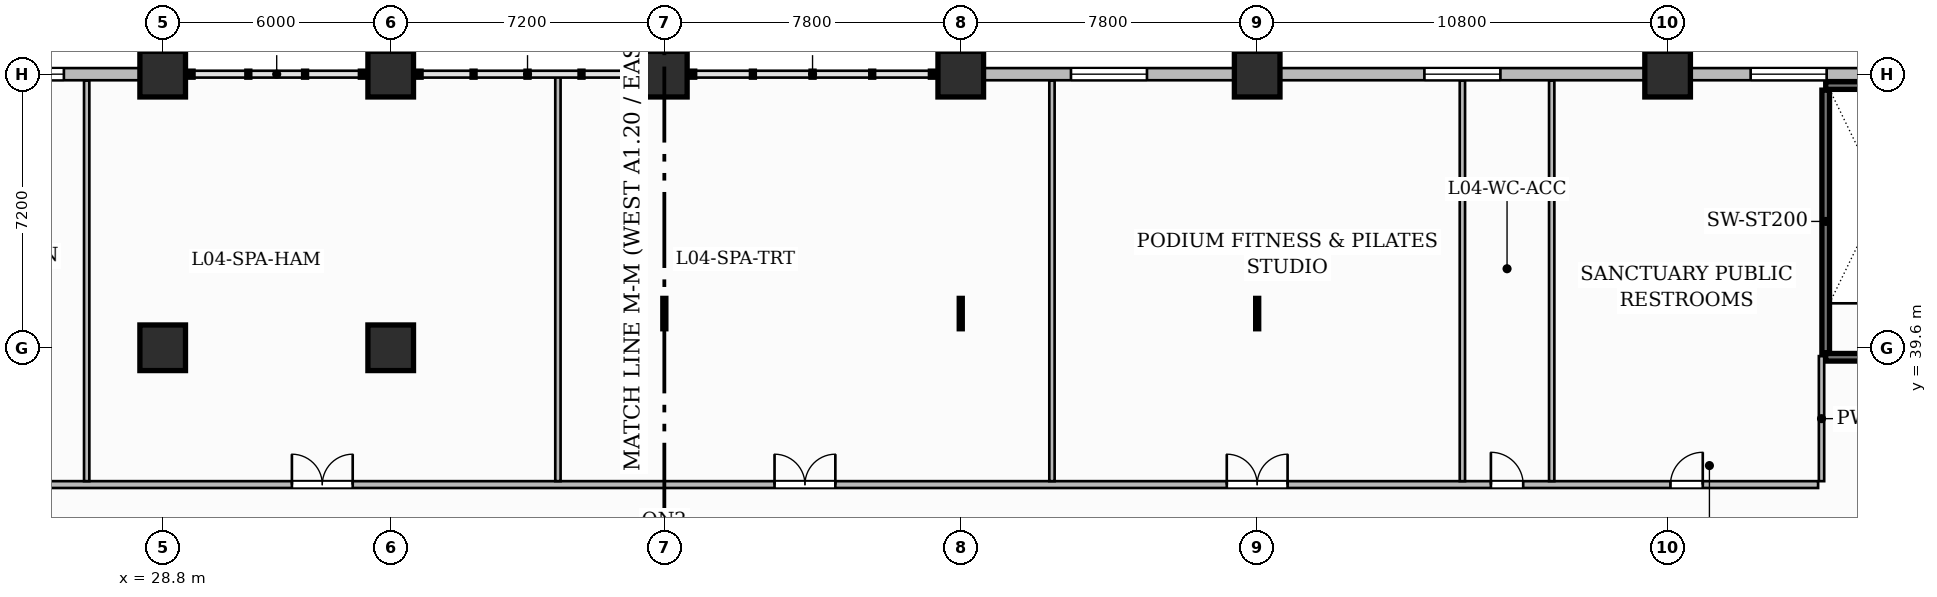
"""IFC4 building model, lengths in metres.
Left out: names, types, materials, properties, quantities, classifications, styles, units other than length and angle.
Written with IfcOpenShell. Run it as: python <this file> out.ifc"""

import sys

from ifc_helpers import new_model, si_unit, direction, frame, frame_2d, origin, origin_2d, place, context, subcontext, project, spatial, rectangle, extrude, source, transform, mapped, element, fill, save


model = new_model("IFC4")
c1 = context("Model", 3, precision=1e-05, world=origin(), true_north=direction((0.0, 1.0)))
c2 = subcontext(c1, "Body", "Model", "MODEL_VIEW")
j1 = project(units=[si_unit("LENGTHUNIT", "METRE"), si_unit("PLANEANGLEUNIT", "RADIAN")], contexts=[c1])
p1 = place(None, origin())
s1 = spatial("IfcSite", under=j1, at=p1, CompositionType="ELEMENT")
p2 = place(p1, origin())
s2 = spatial("IfcBuilding", under=s1, at=p2, CompositionType="ELEMENT")
p3 = place(p2, frame((0.0, 0.0, 21.6)))
s3 = spatial("IfcBuildingStorey", under=s2, at=p3, CompositionType="ELEMENT", Elevation=21.6)
m1 = source(origin(), c2, "Body", "SweptSolid", [
    extrude(rectangle(XDim=1.2, YDim=1.2, at=origin_2d()), origin(), (0.0, 0.0, 1.0), 5.4),
])
for number, where, z_axis, x_axis in (
    (1, (28.8, 39.6, 0.0), (0.0, 0.0, 1.0), (1.0, 0.0, 0.0)),
    (2, (28.8, 46.8, 0.0), (0.0, 0.0, 1.0), (1.0, 0.0, 0.0)),
    (3, (34.8, 39.6, 0.0), (0.0, 0.0, 1.0), (1.0, 0.0, 0.0)),
    (4, (34.8, 46.8, 0.0), (0.0, 0.0, 1.0), (1.0, 0.0, 0.0)),
    (5, (42.0, 46.8, 0.0), (0.0, 0.0, 1.0), (1.0, 0.0, 0.0)),
    (6, (49.8, 46.8, 0.0), (0.0, 0.0, 1.0), (1.0, 0.0, 0.0)),
    (7, (57.6, 46.8, 0.0), (0.0, 0.0, 1.0), (1.0, 0.0, 0.0)),
    (8, (68.4, 46.8, 0.0), (0.0, 0.0, 1.0), (1.0, 0.0, 0.0)),
):
    element("IfcColumn", number, at=place(p3, frame(where, z_axis=z_axis, x_axis=x_axis)), inside=s3, PredefinedType="COLUMN", context=c2, shape_type="MappedRepresentation", body=[
        mapped(m1, transform((0.0, 0.0, 0.0), scale=1.0)),
    ])
p4 = place(p3, frame((72.56, 39.47, 0.0), z_axis=(0.0, 0.0, 1.0), x_axis=(0.0, 1.0, 0.0)))
e9 = element("IfcWall", 9, at=p4, inside=s3, PredefinedType="SHEAR", context=c2, shape_type="SweptSolid", body=[
    extrude(rectangle(XDim=6.91, YDim=0.2, at=frame_2d((3.455, 0.0))), origin(), (0.0, 0.0, 1.0), 5.4),
])
p5 = place(p3, frame((72.56, 46.5, 0.0), z_axis=(0.0, 0.0, 1.0), x_axis=(1.0, 0.0, 0.0)))
e10 = element("IfcWall", 10, at=p5, inside=s3, PredefinedType="SHEAR", context=c2, shape_type="SweptSolid", body=[
    extrude(rectangle(XDim=2.94, YDim=0.2, at=frame_2d((1.47, 0.0))), origin(), (0.0, 0.0, 1.0), 5.4),
])
p6 = place(p3, frame((72.56, 39.35, 0.0), z_axis=(0.0, 0.0, 1.0), x_axis=(1.0, 0.0, 0.0)))
e11 = element("IfcWall", 11, at=p6, inside=s3, PredefinedType="SHEAR", context=c2, shape_type="SweptSolid", body=[
    extrude(rectangle(XDim=2.94, YDim=0.2, at=frame_2d((1.47, 0.0))), origin(), (0.0, 0.0, 1.0), 5.4),
])
p7 = place(p6, frame((0.985, 0.0, 0.0)))
e12 = element("IfcOpeningElement", 12, at=p7, cuts=e11, PredefinedType="OPENING", context=c2, shape_type="SweptSolid", body=[
    extrude(rectangle(XDim=1.05, YDim=2.2, at=frame_2d((0.525, 1.1))), frame((0.0, 0.11, 0.0), z_axis=(0.0, -1.0, 0.0), x_axis=(1.0, 0.0, 0.0)), (0.0, 0.0, 1.0), 0.22),
])
p8 = place(p3, frame((72.45, 36.09, 0.0), z_axis=(0.0, 0.0, 1.0), x_axis=(0.0, 1.0, 0.0)))
e13 = element("IfcWall", 13, at=p8, inside=s3, PredefinedType="PARTITIONING", context=c2, shape_type="SweptSolid", body=[
    extrude(rectangle(XDim=3.29, YDim=0.14, at=frame_2d((1.645, 0.0))), origin(), (0.0, 0.0, 1.0), 5.1),
])
p9 = place(p3, frame((15.89, 36.0, 0.0), z_axis=(0.0, 0.0, 1.0), x_axis=(1.0, 0.0, 0.0)))
e14 = element("IfcWall", 14, at=p9, inside=s3, PredefinedType="PARTITIONING", context=c2, shape_type="SweptSolid", body=[
    extrude(rectangle(XDim=56.47, YDim=0.18, at=frame_2d((28.235, 0.0))), origin(), (0.0, 0.0, 1.0), 2.85),
])
p10 = place(p9, frame((1.335, 0.0, 0.0)))
e15 = element("IfcOpeningElement", 15, at=p10, cuts=e14, PredefinedType="OPENING", context=c2, shape_type="SweptSolid", body=[
    extrude(rectangle(XDim=0.85, YDim=2.1, at=frame_2d((0.425, 1.05))), frame((0.0, 0.1, 0.0), z_axis=(0.0, -1.0, 0.0), x_axis=(1.0, 0.0, 0.0)), (0.0, 0.0, 1.0), 0.2),
])
p11 = place(p9, frame((6.835, 0.0, 0.0)))
e16 = element("IfcOpeningElement", 16, at=p11, cuts=e14, PredefinedType="OPENING", context=c2, shape_type="SweptSolid", body=[
    extrude(rectangle(XDim=0.85, YDim=2.1, at=frame_2d((0.425, 1.05))), frame((0.0, 0.1, 0.0), z_axis=(0.0, -1.0, 0.0), x_axis=(1.0, 0.0, 0.0)), (0.0, 0.0, 1.0), 0.2),
])
p12 = place(p9, frame((16.31, 0.0, 0.0)))
e17 = element("IfcOpeningElement", 17, at=p12, cuts=e14, PredefinedType="OPENING", context=c2, shape_type="SweptSolid", body=[
    extrude(rectangle(XDim=1.6, YDim=2.4, at=frame_2d((0.8, 1.2))), frame((0.0, 0.1, 0.0), z_axis=(0.0, -1.0, 0.0), x_axis=(1.0, 0.0, 0.0)), (0.0, 0.0, 1.0), 0.2),
])
p13 = place(p9, frame((29.01, 0.0, 0.0)))
e18 = element("IfcOpeningElement", 18, at=p13, cuts=e14, PredefinedType="OPENING", context=c2, shape_type="SweptSolid", body=[
    extrude(rectangle(XDim=1.6, YDim=2.4, at=frame_2d((0.8, 1.2))), frame((0.0, 0.1, 0.0), z_axis=(0.0, -1.0, 0.0), x_axis=(1.0, 0.0, 0.0)), (0.0, 0.0, 1.0), 0.2),
])
p14 = place(p9, frame((40.91, 0.0, 0.0)))
e19 = element("IfcOpeningElement", 19, at=p14, cuts=e14, PredefinedType="OPENING", context=c2, shape_type="SweptSolid", body=[
    extrude(rectangle(XDim=1.6, YDim=2.4, at=frame_2d((0.8, 1.2))), frame((0.0, 0.1, 0.0), z_axis=(0.0, -1.0, 0.0), x_axis=(1.0, 0.0, 0.0)), (0.0, 0.0, 1.0), 0.2),
])
p15 = place(p9, frame((47.86, 0.0, 0.0)))
e20 = element("IfcOpeningElement", 20, at=p15, cuts=e14, PredefinedType="OPENING", context=c2, shape_type="SweptSolid", body=[
    extrude(rectangle(XDim=0.85, YDim=2.1, at=frame_2d((0.425, 1.05))), frame((0.0, 0.1, 0.0), z_axis=(0.0, -1.0, 0.0), x_axis=(1.0, 0.0, 0.0)), (0.0, 0.0, 1.0), 0.2),
])
p16 = place(p9, frame((52.585, 0.0, 0.0)))
e21 = element("IfcOpeningElement", 21, at=p16, cuts=e14, PredefinedType="OPENING", context=c2, shape_type="SweptSolid", body=[
    extrude(rectangle(XDim=0.85, YDim=2.1, at=frame_2d((0.425, 1.05))), frame((0.0, 0.1, 0.0), z_axis=(0.0, -1.0, 0.0), x_axis=(1.0, 0.0, 0.0)), (0.0, 0.0, 1.0), 0.2),
])
p17 = place(p3, frame((26.8, 36.09, 0.0), z_axis=(0.0, 0.0, 1.0), x_axis=(0.0, 1.0, 0.0)))
e22 = element("IfcWall", 22, at=p17, inside=s3, PredefinedType="PARTITIONING", context=c2, shape_type="SweptSolid", body=[
    extrude(rectangle(XDim=10.542, YDim=0.14, at=frame_2d((5.271, 0.0))), origin(), (0.0, 0.0, 1.0), 5.1),
])
p18 = place(p3, frame((39.2, 36.09, 0.0), z_axis=(0.0, 0.0, 1.0), x_axis=(0.0, 1.0, 0.0)))
e23 = element("IfcWall", 23, at=p18, inside=s3, PredefinedType="PARTITIONING", context=c2, shape_type="SweptSolid", body=[
    extrude(rectangle(XDim=10.682, YDim=0.14, at=frame_2d((5.341, 0.0))), origin(), (0.0, 0.0, 1.0), 5.1),
])
for number, where, z_axis, x_axis in (
    (24, (52.2, 36.09, 0.0), (0.0, 0.0, 1.0), (0.0, 1.0, 0.0)),
    (25, (63.0, 36.09, 0.0), (0.0, 0.0, 1.0), (0.0, 1.0, 0.0)),
    (26, (65.35, 36.09, 0.0), (0.0, 0.0, 1.0), (0.0, 1.0, 0.0)),
):
    element("IfcWall", number, at=place(p3, frame(where, z_axis=z_axis, x_axis=x_axis)), inside=s3, PredefinedType="PARTITIONING", context=c2, shape_type="SweptSolid", body=[
        extrude(rectangle(XDim=10.542, YDim=0.14, at=frame_2d((5.271, 0.0))), origin(), (0.0, 0.0, 1.0), 5.1),
    ])
p19 = place(p3, frame((-4.8, 46.8, 0.0), z_axis=(0.0, 0.0, 1.0), x_axis=(1.0, 0.0, 0.0)))
e27 = element("IfcWall", 27, at=p19, inside=s3, PredefinedType="SOLIDWALL", context=c2, shape_type="SweptSolid", body=[
    extrude(rectangle(XDim=33.6, YDim=0.32, at=frame_2d((16.8, 0.0))), origin(), (0.0, 0.0, 1.0), 4.085),
])
p20 = place(p19, frame((1.4, 0.0, 0.75)))
e28 = element("IfcOpeningElement", 28, at=p20, cuts=e27, PredefinedType="OPENING", context=c2, shape_type="SweptSolid", body=[
    extrude(rectangle(XDim=2.0, YDim=2.6, at=frame_2d((1.0, 1.3))), frame((0.0, 0.17, 0.0), z_axis=(0.0, -1.0, 0.0), x_axis=(1.0, 0.0, 0.0)), (0.0, 0.0, 1.0), 0.34),
])
p21 = place(p19, frame((7.4, 0.0, 0.75)))
e29 = element("IfcOpeningElement", 29, at=p21, cuts=e27, PredefinedType="OPENING", context=c2, shape_type="SweptSolid", body=[
    extrude(rectangle(XDim=2.0, YDim=2.6, at=frame_2d((1.0, 1.3))), frame((0.0, 0.17, 0.0), z_axis=(0.0, -1.0, 0.0), x_axis=(1.0, 0.0, 0.0)), (0.0, 0.0, 1.0), 0.34),
])
p22 = place(p19, frame((14.6, 0.0, 0.75)))
e30 = element("IfcOpeningElement", 30, at=p22, cuts=e27, PredefinedType="OPENING", context=c2, shape_type="SweptSolid", body=[
    extrude(rectangle(XDim=2.0, YDim=2.6, at=frame_2d((1.0, 1.3))), frame((0.0, 0.17, 0.0), z_axis=(0.0, -1.0, 0.0), x_axis=(1.0, 0.0, 0.0)), (0.0, 0.0, 1.0), 0.34),
])
p23 = place(p19, frame((29.0, 0.0, 0.75)))
e31 = element("IfcOpeningElement", 31, at=p23, cuts=e27, PredefinedType="OPENING", context=c2, shape_type="SweptSolid", body=[
    extrude(rectangle(XDim=2.0, YDim=2.6, at=frame_2d((1.0, 1.3))), frame((0.0, 0.17, 0.0), z_axis=(0.0, -1.0, 0.0), x_axis=(1.0, 0.0, 0.0)), (0.0, 0.0, 1.0), 0.34),
])
p24 = place(p3, frame((49.8, 46.8, 0.0), z_axis=(0.0, 0.0, 1.0), x_axis=(1.0, 0.0, 0.0)))
e32 = element("IfcWall", 32, at=p24, inside=s3, PredefinedType="SOLIDWALL", context=c2, shape_type="SweptSolid", body=[
    extrude(rectangle(XDim=30.6, YDim=0.32, at=frame_2d((15.3, 0.0))), origin(), (0.0, 0.0, 1.0), 5.1),
])
p25 = place(p24, frame((2.9, 0.0, 0.75)))
e33 = element("IfcOpeningElement", 33, at=p25, cuts=e32, PredefinedType="OPENING", context=c2, shape_type="SweptSolid", body=[
    extrude(rectangle(XDim=2.0, YDim=2.6, at=frame_2d((1.0, 1.3))), frame((0.0, 0.17, 0.0), z_axis=(0.0, -1.0, 0.0), x_axis=(1.0, 0.0, 0.0)), (0.0, 0.0, 1.0), 0.34),
])
p26 = place(p24, frame((12.2, 0.0, 0.75)))
e34 = element("IfcOpeningElement", 34, at=p26, cuts=e32, PredefinedType="OPENING", context=c2, shape_type="SweptSolid", body=[
    extrude(rectangle(XDim=2.0, YDim=2.6, at=frame_2d((1.0, 1.3))), frame((0.0, 0.17, 0.0), z_axis=(0.0, -1.0, 0.0), x_axis=(1.0, 0.0, 0.0)), (0.0, 0.0, 1.0), 0.34),
])
p27 = place(p24, frame((20.785, 0.0, 0.75)))
e35 = element("IfcOpeningElement", 35, at=p27, cuts=e32, PredefinedType="OPENING", context=c2, shape_type="SweptSolid", body=[
    extrude(rectangle(XDim=2.0, YDim=2.6, at=frame_2d((1.0, 1.3))), frame((0.0, 0.17, 0.0), z_axis=(0.0, -1.0, 0.0), x_axis=(1.0, 0.0, 0.0)), (0.0, 0.0, 1.0), 0.34),
])
p28 = place(p24, frame((25.445, 0.0, 0.75)))
e36 = element("IfcOpeningElement", 36, at=p28, cuts=e32, PredefinedType="OPENING", context=c2, shape_type="SweptSolid", body=[
    extrude(rectangle(XDim=2.0, YDim=2.6, at=frame_2d((1.0, 1.3))), frame((0.0, 0.17, 0.0), z_axis=(0.0, -1.0, 0.0), x_axis=(1.0, 0.0, 0.0)), (0.0, 0.0, 1.0), 0.34),
])
m2 = source(origin(), c2, "Body", "SweptSolid", [
    extrude(rectangle(XDim=1.6, YDim=2.4, at=frame_2d((0.8, 1.2))), frame((0.0, 0.025, 0.0), z_axis=(0.0, -1.0, 0.0), x_axis=(1.0, 0.0, 0.0)), (0.0, 0.0, 1.0), 0.05),
])
p29 = place(p12, origin())
e37 = element("IfcDoor", 37, at=p29, inside=s3, OperationType="DOUBLE_DOOR_SINGLE_SWING", PredefinedType="DOOR", context=c2, shape_type="MappedRepresentation", body=[
    mapped(m2, transform((0.0, 0.0, 0.0), scale=1.0)),
])
fill(e17, e37)
p30 = place(p13, origin())
e38 = element("IfcDoor", 38, at=p30, inside=s3, OperationType="DOUBLE_DOOR_SINGLE_SWING", PredefinedType="DOOR", context=c2, shape_type="MappedRepresentation", body=[
    mapped(m2, transform((0.0, 0.0, 0.0), scale=1.0)),
])
fill(e18, e38)
p31 = place(p14, origin())
e39 = element("IfcDoor", 39, at=p31, inside=s3, OperationType="DOUBLE_DOOR_SINGLE_SWING", PredefinedType="DOOR", context=c2, shape_type="MappedRepresentation", body=[
    mapped(m2, transform((0.0, 0.0, 0.0), scale=1.0)),
])
fill(e19, e39)
m3 = source(origin(), c2, "Body", "SweptSolid", [
    extrude(rectangle(XDim=0.85, YDim=2.1, at=frame_2d((0.425, 1.05))), frame((0.0, 0.025, 0.0), z_axis=(0.0, -1.0, 0.0), x_axis=(1.0, 0.0, 0.0)), (0.0, 0.0, 1.0), 0.05),
])
p32 = place(p15, origin())
e40 = element("IfcDoor", 40, at=p32, inside=s3, OperationType="SINGLE_SWING_LEFT", PredefinedType="DOOR", context=c2, shape_type="MappedRepresentation", body=[
    mapped(m3, transform((0.0, 0.0, 0.0), scale=1.0)),
])
fill(e20, e40)
p33 = place(p16, origin())
e41 = element("IfcDoor", 41, at=p33, inside=s3, OperationType="SINGLE_SWING_RIGHT", PredefinedType="DOOR", context=c2, shape_type="MappedRepresentation", body=[
    mapped(m3, transform((0.0, 0.0, 0.0), scale=1.0)),
])
fill(e21, e41)
m4 = source(origin(), c2, "Body", "SweptSolid", [
    extrude(rectangle(XDim=2.0, YDim=2.6, at=frame_2d((1.0, 1.3))), frame((0.0, 0.03, 0.0), z_axis=(0.0, -1.0, 0.0), x_axis=(1.0, 0.0, 0.0)), (0.0, 0.0, 1.0), 0.06),
])
p34 = place(p23, origin())
e42 = element("IfcWindow", 42, at=p34, inside=s3, PartitioningType="DOUBLE_PANEL_VERTICAL", PredefinedType="WINDOW", context=c2, shape_type="MappedRepresentation", body=[
    mapped(m4, transform((0.0, 0.0, 0.0), scale=1.0)),
])
fill(e31, e42)
p35 = place(p25, origin())
e43 = element("IfcWindow", 43, at=p35, inside=s3, PartitioningType="DOUBLE_PANEL_VERTICAL", PredefinedType="WINDOW", context=c2, shape_type="MappedRepresentation", body=[
    mapped(m4, transform((0.0, 0.0, 0.0), scale=1.0)),
])
fill(e33, e43)
p36 = place(p26, origin())
e44 = element("IfcWindow", 44, at=p36, inside=s3, PartitioningType="DOUBLE_PANEL_VERTICAL", PredefinedType="WINDOW", context=c2, shape_type="MappedRepresentation", body=[
    mapped(m4, transform((0.0, 0.0, 0.0), scale=1.0)),
])
fill(e34, e44)
p37 = place(p27, origin())
e45 = element("IfcWindow", 45, at=p37, inside=s3, PartitioningType="DOUBLE_PANEL_VERTICAL", PredefinedType="WINDOW", context=c2, shape_type="MappedRepresentation", body=[
    mapped(m4, transform((0.0, 0.0, 0.0), scale=1.0)),
])
fill(e35, e45)
save(model, sys.argv[1])
